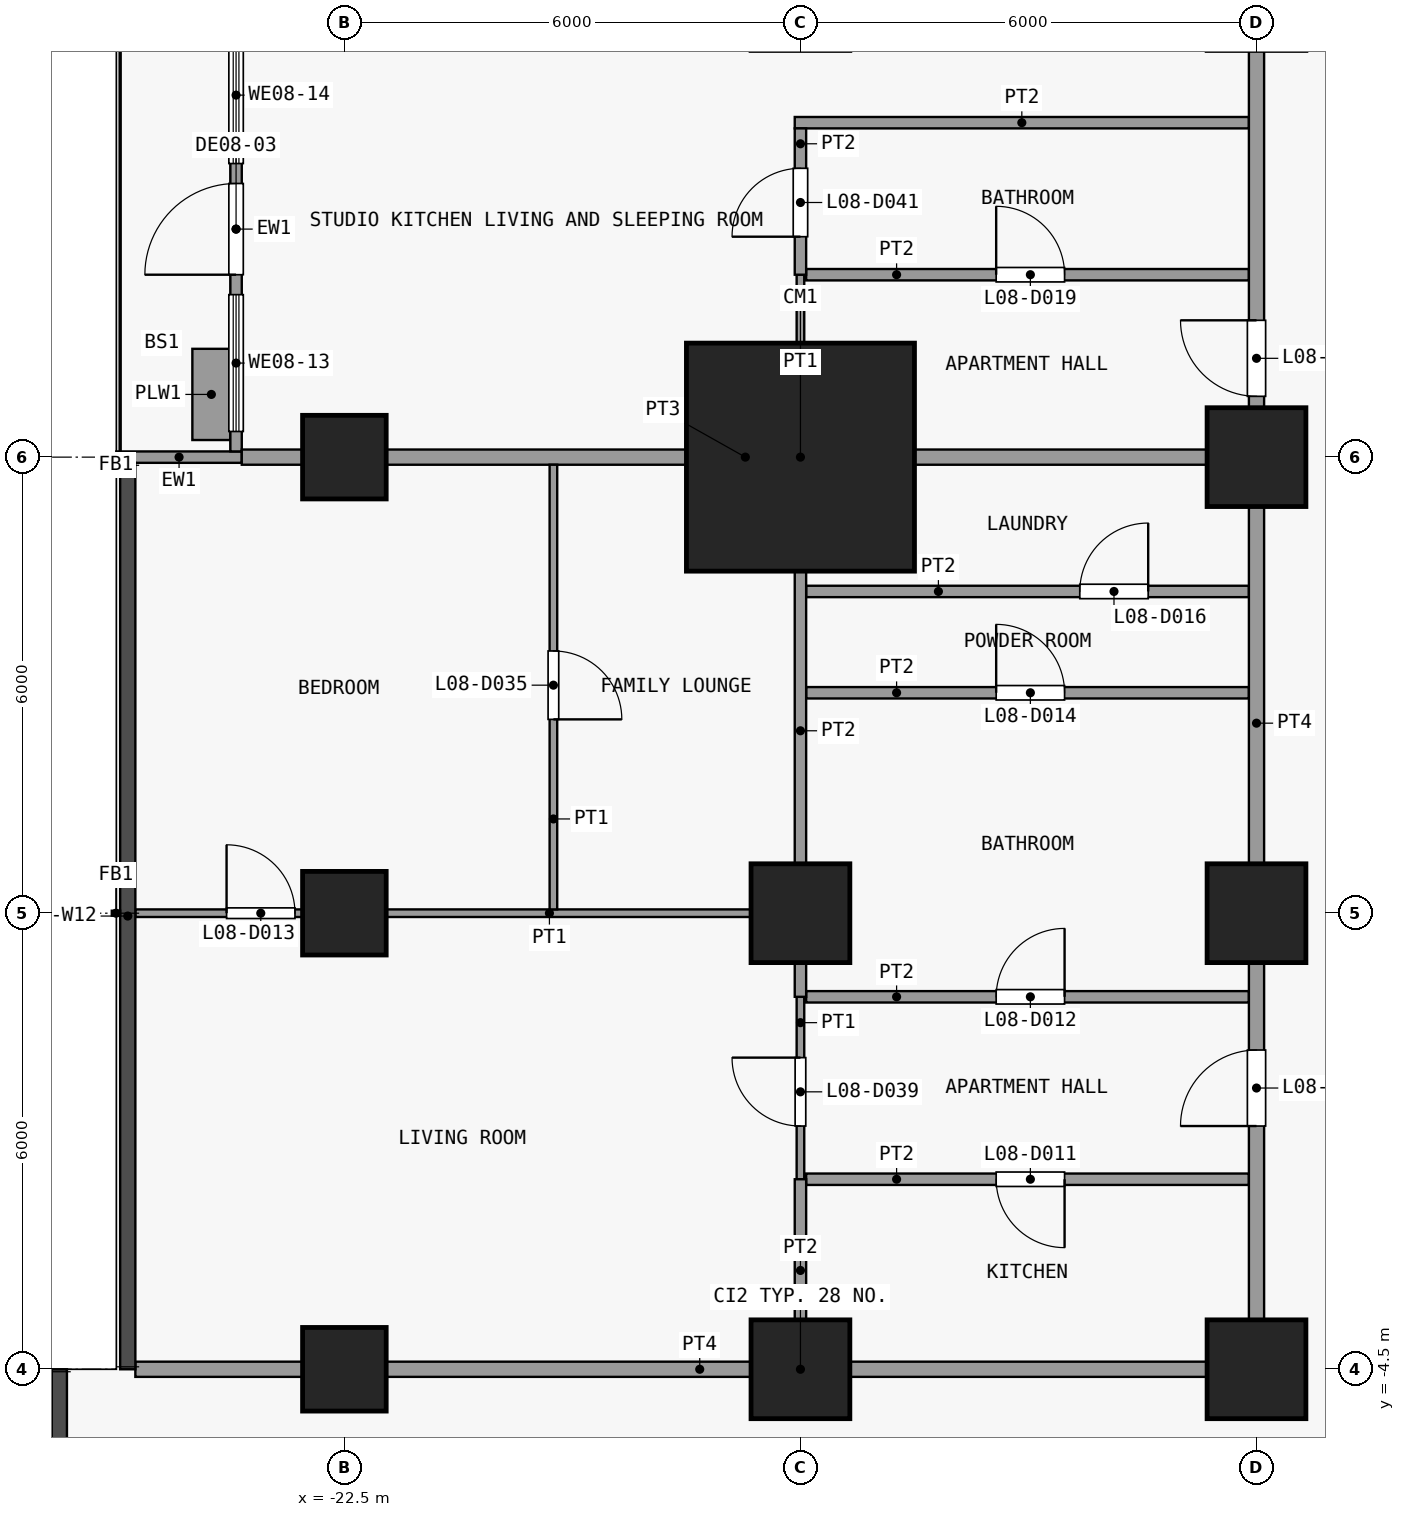
"""IFC4 building model, lengths in metres.
Left out: names, types, materials, properties, quantities, classifications, styles, units other than length and angle.
Written with IfcOpenShell. Run it as: python <this file> out.ifc"""

import sys

from ifc_helpers import new_model, si_unit, direction, frame, frame_2d, origin, origin_2d, place, context, subcontext, project, spatial, rectangle, extrude, element, fill, save


model = new_model("IFC4")
c1 = context("Model", 3, precision=1e-05, world=origin(), true_north=direction((0.0, 1.0)))
c2 = subcontext(c1, "Body", "Model", "MODEL_VIEW")
j1 = project(units=[si_unit("LENGTHUNIT", "METRE"), si_unit("PLANEANGLEUNIT", "RADIAN")], contexts=[c1])
p1 = place(None, origin())
s1 = spatial("IfcSite", under=j1, at=p1, CompositionType="ELEMENT")
p2 = place(p1, origin())
s2 = spatial("IfcBuilding", under=s1, at=p2, CompositionType="ELEMENT")
p3 = place(p2, frame((0.0, 0.0, 39.7)))
s3 = spatial("IfcBuildingStorey", under=s2, at=p3, CompositionType="ELEMENT", Elevation=39.7)
for number, where, z_axis, x_axis in (
    (1, (-22.5, -4.5, 0.0), (0.0, 0.0, 1.0), (1.0, 0.0, 0.0)),
    (2, (-22.5, 1.5, 0.0), (0.0, 0.0, 1.0), (1.0, 0.0, 0.0)),
    (3, (-22.5, 7.5, 0.0), (0.0, 0.0, 1.0), (1.0, 0.0, 0.0)),
):
    element("IfcColumn", number, at=place(p3, frame(where, z_axis=z_axis, x_axis=x_axis)), inside=s3, PredefinedType="COLUMN", context=c2, shape_type="SweptSolid", body=[
        extrude(rectangle(XDim=1.1, YDim=1.1, at=origin_2d()), origin(), (0.0, 0.0, 1.0), 3.6),
    ])
for number, where, z_axis, x_axis in (
    (4, (-16.5, -4.5, 0.0), (0.0, 0.0, 1.0), (1.0, 0.0, 0.0)),
    (5, (-16.5, 1.5, 0.0), (0.0, 0.0, 1.0), (1.0, 0.0, 0.0)),
):
    element("IfcColumn", number, at=place(p3, frame(where, z_axis=z_axis, x_axis=x_axis)), inside=s3, PredefinedType="COLUMN", context=c2, shape_type="SweptSolid", body=[
        extrude(rectangle(XDim=1.3, YDim=1.3, at=origin_2d()), origin(), (0.0, 0.0, 1.0), 3.6),
    ])
p4 = place(p3, frame((-16.5, 7.5, 0.0), z_axis=(0.0, 0.0, 1.0), x_axis=(1.0, 0.0, 0.0)))
e6 = element("IfcColumn", 6, at=p4, inside=s3, PredefinedType="COLUMN", context=c2, shape_type="SweptSolid", body=[
    extrude(rectangle(XDim=3.0, YDim=3.0, at=origin_2d()), origin(), (0.0, 0.0, 1.0), 3.6),
])
for number, where, z_axis, x_axis in (
    (7, (-10.5, -4.5, 0.0), (0.0, 0.0, 1.0), (1.0, 0.0, 0.0)),
    (8, (-10.5, 1.5, 0.0), (0.0, 0.0, 1.0), (1.0, 0.0, 0.0)),
    (9, (-10.5, 7.5, 0.0), (0.0, 0.0, 1.0), (1.0, 0.0, 0.0)),
):
    element("IfcColumn", number, at=place(p3, frame(where, z_axis=z_axis, x_axis=x_axis)), inside=s3, PredefinedType="COLUMN", context=c2, shape_type="SweptSolid", body=[
        extrude(rectangle(XDim=1.3, YDim=1.3, at=origin_2d()), origin(), (0.0, 0.0, 1.0), 3.6),
    ])
p5 = place(p3, frame((-23.85, 7.5, 0.0), z_axis=(0.0, 0.0, 1.0), x_axis=(-1.0, 0.0, 0.0)))
e10 = element("IfcWall", 10, at=p5, inside=s3, PredefinedType="SOLIDWALL", context=c2, shape_type="SweptSolid", body=[
    extrude(rectangle(XDim=1.65, YDim=0.15, at=frame_2d((0.825, 0.0))), origin(), (0.0, 0.0, 1.0), 3.3),
])
p6 = place(p3, frame((-23.925, 7.575, 0.0), z_axis=(0.0, 0.0, 1.0), x_axis=(0.0, 1.0, 0.0)))
e11 = element("IfcWall", 11, at=p6, inside=s3, PredefinedType="SOLIDWALL", context=c2, shape_type="SweptSolid", body=[
    extrude(rectangle(XDim=5.85, YDim=0.15, at=frame_2d((2.925, 0.0))), origin(), (0.0, 0.0, 1.0), 3.3),
])
p7 = place(p6, frame((2.325, 0.0, 0.0)))
e12 = element("IfcOpeningElement", 12, at=p7, cuts=e11, PredefinedType="OPENING", context=c2, shape_type="SweptSolid", body=[
    extrude(rectangle(XDim=1.2, YDim=2.4, at=frame_2d((0.6, 1.2))), frame((0.0, 0.085, 0.0), z_axis=(0.0, -1.0, 0.0), x_axis=(1.0, 0.0, 0.0)), (0.0, 0.0, 1.0), 0.17),
])
p8 = place(p6, frame((0.262, 0.0, 0.9)))
e13 = element("IfcOpeningElement", 13, at=p8, cuts=e11, PredefinedType="OPENING", context=c2, shape_type="SweptSolid", body=[
    extrude(rectangle(XDim=1.8, YDim=2.1, at=frame_2d((0.9, 1.05))), frame((0.0, 0.085, 0.0), z_axis=(0.0, -1.0, 0.0), x_axis=(1.0, 0.0, 0.0)), (0.0, 0.0, 1.0), 0.17),
])
p9 = place(p6, frame((3.788, 0.0, 0.9)))
e14 = element("IfcOpeningElement", 14, at=p9, cuts=e11, PredefinedType="OPENING", context=c2, shape_type="SweptSolid", body=[
    extrude(rectangle(XDim=1.8, YDim=2.1, at=frame_2d((0.9, 1.05))), frame((0.0, 0.085, 0.0), z_axis=(0.0, -1.0, 0.0), x_axis=(1.0, 0.0, 0.0)), (0.0, 0.0, 1.0), 0.17),
])
p10 = place(p3, frame((-24.25, 7.725, 0.0), z_axis=(0.0, 0.0, 1.0), x_axis=(0.0, 1.0, 0.0)))
e15 = element("IfcWall", 15, at=p10, inside=s3, PredefinedType="USERDEFINED", context=c2, shape_type="SweptSolid", body=[
    extrude(rectangle(XDim=1.2, YDim=0.5, at=frame_2d((0.6, 0.0))), origin(), (0.0, 0.0, 1.0), 0.9),
])
p11 = place(p3, frame((-25.25, -4.5, 0.0), z_axis=(0.0, 0.0, 1.0), x_axis=(1.0, 0.0, 0.0)))
e16 = element("IfcWall", 16, at=p11, inside=s3, PredefinedType="PARTITIONING", context=c2, shape_type="SweptSolid", body=[
    extrude(rectangle(XDim=14.85, YDim=0.2, at=frame_2d((7.425, 0.0))), origin(), (0.0, 0.0, 1.0), 3.3),
])
p12 = place(p3, frame((-16.425, -2.0, 0.0), z_axis=(0.0, 0.0, 1.0), x_axis=(1.0, 0.0, 0.0)))
e17 = element("IfcWall", 17, at=p12, inside=s3, PredefinedType="PARTITIONING", context=c2, shape_type="SweptSolid", body=[
    extrude(rectangle(XDim=5.825, YDim=0.15, at=frame_2d((2.913, 0.0))), origin(), (0.0, 0.0, 1.0), 3.3),
])
p13 = place(p12, frame((2.5, 0.0, 0.0)))
e18 = element("IfcOpeningElement", 18, at=p13, cuts=e17, PredefinedType="OPENING", context=c2, shape_type="SweptSolid", body=[
    extrude(rectangle(XDim=0.9, YDim=2.1, at=frame_2d((0.45, 1.05))), frame((0.0, 0.085, 0.0), z_axis=(0.0, -1.0, 0.0), x_axis=(1.0, 0.0, 0.0)), (0.0, 0.0, 1.0), 0.17),
])
p14 = place(p3, frame((-16.425, 0.4, 0.0), z_axis=(0.0, 0.0, 1.0), x_axis=(1.0, 0.0, 0.0)))
e19 = element("IfcWall", 19, at=p14, inside=s3, PredefinedType="PARTITIONING", context=c2, shape_type="SweptSolid", body=[
    extrude(rectangle(XDim=5.825, YDim=0.15, at=frame_2d((2.913, 0.0))), origin(), (0.0, 0.0, 1.0), 3.3),
])
p15 = place(p14, frame((2.5, 0.0, 0.0)))
e20 = element("IfcOpeningElement", 20, at=p15, cuts=e19, PredefinedType="OPENING", context=c2, shape_type="SweptSolid", body=[
    extrude(rectangle(XDim=0.9, YDim=2.1, at=frame_2d((0.45, 1.05))), frame((0.0, 0.085, 0.0), z_axis=(0.0, -1.0, 0.0), x_axis=(1.0, 0.0, 0.0)), (0.0, 0.0, 1.0), 0.17),
])
p16 = place(p3, frame((-25.25, 1.5, 0.0), z_axis=(0.0, 0.0, 1.0), x_axis=(1.0, 0.0, 0.0)))
e21 = element("IfcWall", 21, at=p16, inside=s3, PredefinedType="PARTITIONING", context=c2, shape_type="SweptSolid", body=[
    extrude(rectangle(XDim=8.675, YDim=0.1, at=frame_2d((4.337, 0.0))), origin(), (0.0, 0.0, 1.0), 3.3),
])
p17 = place(p16, frame((1.2, 0.0, 0.0)))
e22 = element("IfcOpeningElement", 22, at=p17, cuts=e21, PredefinedType="OPENING", context=c2, shape_type="SweptSolid", body=[
    extrude(rectangle(XDim=0.9, YDim=2.1, at=frame_2d((0.45, 1.05))), frame((0.0, 0.06, 0.0), z_axis=(0.0, -1.0, 0.0), x_axis=(1.0, 0.0, 0.0)), (0.0, 0.0, 1.0), 0.12),
])
p18 = place(p3, frame((-16.425, 4.4, 0.0), z_axis=(0.0, 0.0, 1.0), x_axis=(1.0, 0.0, 0.0)))
e23 = element("IfcWall", 23, at=p18, inside=s3, PredefinedType="PARTITIONING", context=c2, shape_type="SweptSolid", body=[
    extrude(rectangle(XDim=5.825, YDim=0.15, at=frame_2d((2.913, 0.0))), origin(), (0.0, 0.0, 1.0), 3.3),
])
p19 = place(p18, frame((2.5, 0.0, 0.0)))
e24 = element("IfcOpeningElement", 24, at=p19, cuts=e23, PredefinedType="OPENING", context=c2, shape_type="SweptSolid", body=[
    extrude(rectangle(XDim=0.9, YDim=2.1, at=frame_2d((0.45, 1.05))), frame((0.0, 0.085, 0.0), z_axis=(0.0, -1.0, 0.0), x_axis=(1.0, 0.0, 0.0)), (0.0, 0.0, 1.0), 0.17),
])
p20 = place(p3, frame((-16.425, 5.733, 0.0), z_axis=(0.0, 0.0, 1.0), x_axis=(1.0, 0.0, 0.0)))
e25 = element("IfcWall", 25, at=p20, inside=s3, PredefinedType="PARTITIONING", context=c2, shape_type="SweptSolid", body=[
    extrude(rectangle(XDim=5.825, YDim=0.15, at=frame_2d((2.913, 0.0))), origin(), (0.0, 0.0, 1.0), 3.3),
])
p21 = place(p20, frame((3.6, 0.0, 0.0)))
e26 = element("IfcOpeningElement", 26, at=p21, cuts=e25, PredefinedType="OPENING", context=c2, shape_type="SweptSolid", body=[
    extrude(rectangle(XDim=0.9, YDim=2.1, at=frame_2d((0.45, 1.05))), frame((0.0, 0.085, 0.0), z_axis=(0.0, -1.0, 0.0), x_axis=(1.0, 0.0, 0.0)), (0.0, 0.0, 1.0), 0.17),
])
p22 = place(p3, frame((-23.85, 7.5, 0.0), z_axis=(0.0, 0.0, 1.0), x_axis=(1.0, 0.0, 0.0)))
e27 = element("IfcWall", 27, at=p22, inside=s3, PredefinedType="PARTITIONING", context=c2, shape_type="SweptSolid", body=[
    extrude(rectangle(XDim=13.25, YDim=0.2, at=frame_2d((6.625, 0.0))), origin(), (0.0, 0.0, 1.0), 3.3),
])
p23 = place(p3, frame((-16.425, 9.9, 0.0), z_axis=(0.0, 0.0, 1.0), x_axis=(1.0, 0.0, 0.0)))
e28 = element("IfcWall", 28, at=p23, inside=s3, PredefinedType="PARTITIONING", context=c2, shape_type="SweptSolid", body=[
    extrude(rectangle(XDim=5.825, YDim=0.15, at=frame_2d((2.913, 0.0))), origin(), (0.0, 0.0, 1.0), 3.3),
])
p24 = place(p23, frame((2.5, 0.0, 0.0)))
e29 = element("IfcOpeningElement", 29, at=p24, cuts=e28, PredefinedType="OPENING", context=c2, shape_type="SweptSolid", body=[
    extrude(rectangle(XDim=0.9, YDim=2.1, at=frame_2d((0.45, 1.05))), frame((0.0, 0.085, 0.0), z_axis=(0.0, -1.0, 0.0), x_axis=(1.0, 0.0, 0.0)), (0.0, 0.0, 1.0), 0.17),
])
p25 = place(p3, frame((-16.575, 11.9, 0.0), z_axis=(0.0, 0.0, 1.0), x_axis=(1.0, 0.0, 0.0)))
e30 = element("IfcWall", 30, at=p25, inside=s3, PredefinedType="PARTITIONING", context=c2, shape_type="SweptSolid", body=[
    extrude(rectangle(XDim=5.975, YDim=0.15, at=frame_2d((2.987, 0.0))), origin(), (0.0, 0.0, 1.0), 3.3),
])
p26 = place(p3, frame((-19.75, 1.55, 0.0), z_axis=(0.0, 0.0, 1.0), x_axis=(0.0, 1.0, 0.0)))
e31 = element("IfcWall", 31, at=p26, inside=s3, PredefinedType="PARTITIONING", context=c2, shape_type="SweptSolid", body=[
    extrude(rectangle(XDim=5.85, YDim=0.1, at=frame_2d((2.925, 0.0))), origin(), (0.0, 0.0, 1.0), 3.3),
])
p27 = place(p26, frame((2.5, 0.0, 0.0)))
e32 = element("IfcOpeningElement", 32, at=p27, cuts=e31, PredefinedType="OPENING", context=c2, shape_type="SweptSolid", body=[
    extrude(rectangle(XDim=0.9, YDim=2.1, at=frame_2d((0.45, 1.05))), frame((0.0, 0.06, 0.0), z_axis=(0.0, -1.0, 0.0), x_axis=(1.0, 0.0, 0.0)), (0.0, 0.0, 1.0), 0.12),
])
p28 = place(p3, frame((-16.5, -2.0, 0.0), z_axis=(0.0, 0.0, 1.0), x_axis=(0.0, 1.0, 0.0)))
e33 = element("IfcWall", 33, at=p28, inside=s3, PredefinedType="PARTITIONING", context=c2, shape_type="SweptSolid", body=[
    extrude(rectangle(XDim=2.4, YDim=0.1, at=frame_2d((1.2, 0.0))), origin(), (0.0, 0.0, 1.0), 3.3),
])
p29 = place(p28, frame((0.7, 0.0, 0.0)))
e34 = element("IfcOpeningElement", 34, at=p29, cuts=e33, PredefinedType="OPENING", context=c2, shape_type="SweptSolid", body=[
    extrude(rectangle(XDim=0.9, YDim=2.1, at=frame_2d((0.45, 1.05))), frame((0.0, 0.06, 0.0), z_axis=(0.0, -1.0, 0.0), x_axis=(1.0, 0.0, 0.0)), (0.0, 0.0, 1.0), 0.12),
])
p30 = place(p3, frame((-16.5, 7.6, 0.0), z_axis=(0.0, 0.0, 1.0), x_axis=(0.0, 1.0, 0.0)))
e35 = element("IfcWall", 35, at=p30, inside=s3, PredefinedType="PARTITIONING", context=c2, shape_type="SweptSolid", body=[
    extrude(rectangle(XDim=2.3, YDim=0.1, at=frame_2d((1.15, 0.0))), origin(), (0.0, 0.0, 1.0), 3.3),
])
p31 = place(p3, frame((-16.5, -4.4, 0.0), z_axis=(0.0, 0.0, 1.0), x_axis=(0.0, 1.0, 0.0)))
e36 = element("IfcWall", 36, at=p31, inside=s3, PredefinedType="PARTITIONING", context=c2, shape_type="SweptSolid", body=[
    extrude(rectangle(XDim=2.4, YDim=0.15, at=frame_2d((1.2, 0.0))), origin(), (0.0, 0.0, 1.0), 3.3),
])
p32 = place(p3, frame((-16.5, 0.4, 0.0), z_axis=(0.0, 0.0, 1.0), x_axis=(0.0, 1.0, 0.0)))
e37 = element("IfcWall", 37, at=p32, inside=s3, PredefinedType="PARTITIONING", context=c2, shape_type="SweptSolid", body=[
    extrude(rectangle(XDim=7.0, YDim=0.15, at=frame_2d((3.5, 0.0))), origin(), (0.0, 0.0, 1.0), 3.3),
])
p33 = place(p3, frame((-16.5, 9.9, 0.0), z_axis=(0.0, 0.0, 1.0), x_axis=(0.0, 1.0, 0.0)))
e38 = element("IfcWall", 38, at=p33, inside=s3, PredefinedType="PARTITIONING", context=c2, shape_type="SweptSolid", body=[
    extrude(rectangle(XDim=1.925, YDim=0.15, at=frame_2d((0.962, 0.0))), origin(), (0.0, 0.0, 1.0), 3.3),
])
p34 = place(p33, frame((0.5, 0.0, 0.0)))
e39 = element("IfcOpeningElement", 39, at=p34, cuts=e38, PredefinedType="OPENING", context=c2, shape_type="SweptSolid", body=[
    extrude(rectangle(XDim=0.9, YDim=2.1, at=frame_2d((0.45, 1.05))), frame((0.0, 0.085, 0.0), z_axis=(0.0, -1.0, 0.0), x_axis=(1.0, 0.0, 0.0)), (0.0, 0.0, 1.0), 0.17),
])
p35 = place(p3, frame((-10.5, -4.4, 0.0), z_axis=(0.0, 0.0, 1.0), x_axis=(0.0, 1.0, 0.0)))
e40 = element("IfcWall", 40, at=p35, inside=s3, PredefinedType="PARTITIONING", context=c2, shape_type="SweptSolid", body=[
    extrude(rectangle(XDim=17.8, YDim=0.2, at=frame_2d((8.9, 0.0))), origin(), (0.0, 0.0, 1.0), 3.3),
])
p36 = place(p35, frame((3.1, 0.0, 0.0)))
e41 = element("IfcOpeningElement", 41, at=p36, cuts=e40, PredefinedType="OPENING", context=c2, shape_type="SweptSolid", body=[
    extrude(rectangle(XDim=1.0, YDim=2.1, at=frame_2d((0.5, 1.05))), frame((0.0, 0.11, 0.0), z_axis=(0.0, -1.0, 0.0), x_axis=(1.0, 0.0, 0.0)), (0.0, 0.0, 1.0), 0.22),
])
p37 = place(p35, frame((12.7, 0.0, 0.0)))
e42 = element("IfcOpeningElement", 42, at=p37, cuts=e40, PredefinedType="OPENING", context=c2, shape_type="SweptSolid", body=[
    extrude(rectangle(XDim=1.0, YDim=2.1, at=frame_2d((0.5, 1.05))), frame((0.0, 0.11, 0.0), z_axis=(0.0, -1.0, 0.0), x_axis=(1.0, 0.0, 0.0)), (0.0, 0.0, 1.0), 0.22),
])
p38 = place(p7, origin())
e43 = element("IfcDoor", 43, at=p38, inside=s3, OperationType="SINGLE_SWING_LEFT", PredefinedType="DOOR", context=c2, shape_type="SweptSolid", body=[
    extrude(rectangle(XDim=1.2, YDim=2.4, at=frame_2d((0.6, 1.2))), frame((0.0, 0.025, 0.0), z_axis=(0.0, -1.0, 0.0), x_axis=(1.0, 0.0, 0.0)), (0.0, 0.0, 1.0), 0.05),
])
fill(e12, e43)
p39 = place(p8, origin())
e44 = element("IfcWindow", 44, at=p39, inside=s3, PartitioningType="SINGLE_PANEL", PredefinedType="WINDOW", context=c2, shape_type="SweptSolid", body=[
    extrude(rectangle(XDim=1.8, YDim=2.1, at=frame_2d((0.9, 1.05))), frame((0.0, 0.03, 0.0), z_axis=(0.0, -1.0, 0.0), x_axis=(1.0, 0.0, 0.0)), (0.0, 0.0, 1.0), 0.06),
])
fill(e13, e44)
p40 = place(p9, origin())
e45 = element("IfcWindow", 45, at=p40, inside=s3, PartitioningType="SINGLE_PANEL", PredefinedType="WINDOW", context=c2, shape_type="SweptSolid", body=[
    extrude(rectangle(XDim=1.8, YDim=2.1, at=frame_2d((0.9, 1.05))), frame((0.0, 0.03, 0.0), z_axis=(0.0, -1.0, 0.0), x_axis=(1.0, 0.0, 0.0)), (0.0, 0.0, 1.0), 0.06),
])
fill(e14, e45)
p41 = place(p13, origin())
e46 = element("IfcDoor", 46, at=p41, inside=s3, OperationType="SINGLE_SWING_RIGHT", PredefinedType="DOOR", context=c2, shape_type="SweptSolid", body=[
    extrude(rectangle(XDim=0.9, YDim=2.1, at=frame_2d((0.45, 1.05))), frame((0.0, 0.025, 0.0), z_axis=(0.0, -1.0, 0.0), x_axis=(1.0, 0.0, 0.0)), (0.0, 0.0, 1.0), 0.05),
])
fill(e18, e46)
p42 = place(p15, origin())
e47 = element("IfcDoor", 47, at=p42, inside=s3, OperationType="SINGLE_SWING_LEFT", PredefinedType="DOOR", context=c2, shape_type="SweptSolid", body=[
    extrude(rectangle(XDim=0.9, YDim=2.1, at=frame_2d((0.45, 1.05))), frame((0.0, 0.025, 0.0), z_axis=(0.0, -1.0, 0.0), x_axis=(1.0, 0.0, 0.0)), (0.0, 0.0, 1.0), 0.05),
])
fill(e20, e47)
p43 = place(p17, origin())
e48 = element("IfcDoor", 48, at=p43, inside=s3, OperationType="SINGLE_SWING_RIGHT", PredefinedType="DOOR", context=c2, shape_type="SweptSolid", body=[
    extrude(rectangle(XDim=0.9, YDim=2.1, at=frame_2d((0.45, 1.05))), frame((0.0, 0.025, 0.0), z_axis=(0.0, -1.0, 0.0), x_axis=(1.0, 0.0, 0.0)), (0.0, 0.0, 1.0), 0.05),
])
fill(e22, e48)
p44 = place(p19, origin())
e49 = element("IfcDoor", 49, at=p44, inside=s3, OperationType="SINGLE_SWING_RIGHT", PredefinedType="DOOR", context=c2, shape_type="SweptSolid", body=[
    extrude(rectangle(XDim=0.9, YDim=2.1, at=frame_2d((0.45, 1.05))), frame((0.0, 0.025, 0.0), z_axis=(0.0, -1.0, 0.0), x_axis=(1.0, 0.0, 0.0)), (0.0, 0.0, 1.0), 0.05),
])
fill(e24, e49)
p45 = place(p21, origin())
e50 = element("IfcDoor", 50, at=p45, inside=s3, OperationType="SINGLE_SWING_LEFT", PredefinedType="DOOR", context=c2, shape_type="SweptSolid", body=[
    extrude(rectangle(XDim=0.9, YDim=2.1, at=frame_2d((0.45, 1.05))), frame((0.0, 0.025, 0.0), z_axis=(0.0, -1.0, 0.0), x_axis=(1.0, 0.0, 0.0)), (0.0, 0.0, 1.0), 0.05),
])
fill(e26, e50)
p46 = place(p24, origin())
e51 = element("IfcDoor", 51, at=p46, inside=s3, OperationType="SINGLE_SWING_RIGHT", PredefinedType="DOOR", context=c2, shape_type="SweptSolid", body=[
    extrude(rectangle(XDim=0.9, YDim=2.1, at=frame_2d((0.45, 1.05))), frame((0.0, 0.025, 0.0), z_axis=(0.0, -1.0, 0.0), x_axis=(1.0, 0.0, 0.0)), (0.0, 0.0, 1.0), 0.05),
])
fill(e29, e51)
p47 = place(p27, origin())
e52 = element("IfcDoor", 52, at=p47, inside=s3, OperationType="SINGLE_SWING_LEFT", PredefinedType="DOOR", context=c2, shape_type="SweptSolid", body=[
    extrude(rectangle(XDim=0.9, YDim=2.1, at=frame_2d((0.45, 1.05))), frame((0.0, 0.025, 0.0), z_axis=(0.0, -1.0, 0.0), x_axis=(1.0, 0.0, 0.0)), (0.0, 0.0, 1.0), 0.05),
])
fill(e32, e52)
p48 = place(p29, origin())
e53 = element("IfcDoor", 53, at=p48, inside=s3, OperationType="SINGLE_SWING_LEFT", PredefinedType="DOOR", context=c2, shape_type="SweptSolid", body=[
    extrude(rectangle(XDim=0.9, YDim=2.1, at=frame_2d((0.45, 1.05))), frame((0.0, 0.025, 0.0), z_axis=(0.0, -1.0, 0.0), x_axis=(1.0, 0.0, 0.0)), (0.0, 0.0, 1.0), 0.05),
])
fill(e34, e53)
p49 = place(p34, origin())
e54 = element("IfcDoor", 54, at=p49, inside=s3, OperationType="SINGLE_SWING_RIGHT", PredefinedType="DOOR", context=c2, shape_type="SweptSolid", body=[
    extrude(rectangle(XDim=0.9, YDim=2.1, at=frame_2d((0.45, 1.05))), frame((0.0, 0.025, 0.0), z_axis=(0.0, -1.0, 0.0), x_axis=(1.0, 0.0, 0.0)), (0.0, 0.0, 1.0), 0.05),
])
fill(e39, e54)
p50 = place(p36, origin())
e55 = element("IfcDoor", 55, at=p50, inside=s3, OperationType="SINGLE_SWING_RIGHT", PredefinedType="DOOR", context=c2, shape_type="SweptSolid", body=[
    extrude(rectangle(XDim=1.0, YDim=2.1, at=frame_2d((0.5, 1.05))), frame((0.0, 0.025, 0.0), z_axis=(0.0, -1.0, 0.0), x_axis=(1.0, 0.0, 0.0)), (0.0, 0.0, 1.0), 0.05),
])
fill(e41, e55)
p51 = place(p37, origin())
e56 = element("IfcDoor", 56, at=p51, inside=s3, OperationType="SINGLE_SWING_LEFT", PredefinedType="DOOR", context=c2, shape_type="SweptSolid", body=[
    extrude(rectangle(XDim=1.0, YDim=2.1, at=frame_2d((0.5, 1.05))), frame((0.0, 0.025, 0.0), z_axis=(0.0, -1.0, 0.0), x_axis=(1.0, 0.0, 0.0)), (0.0, 0.0, 1.0), 0.05),
])
fill(e42, e56)
save(model, sys.argv[1])
